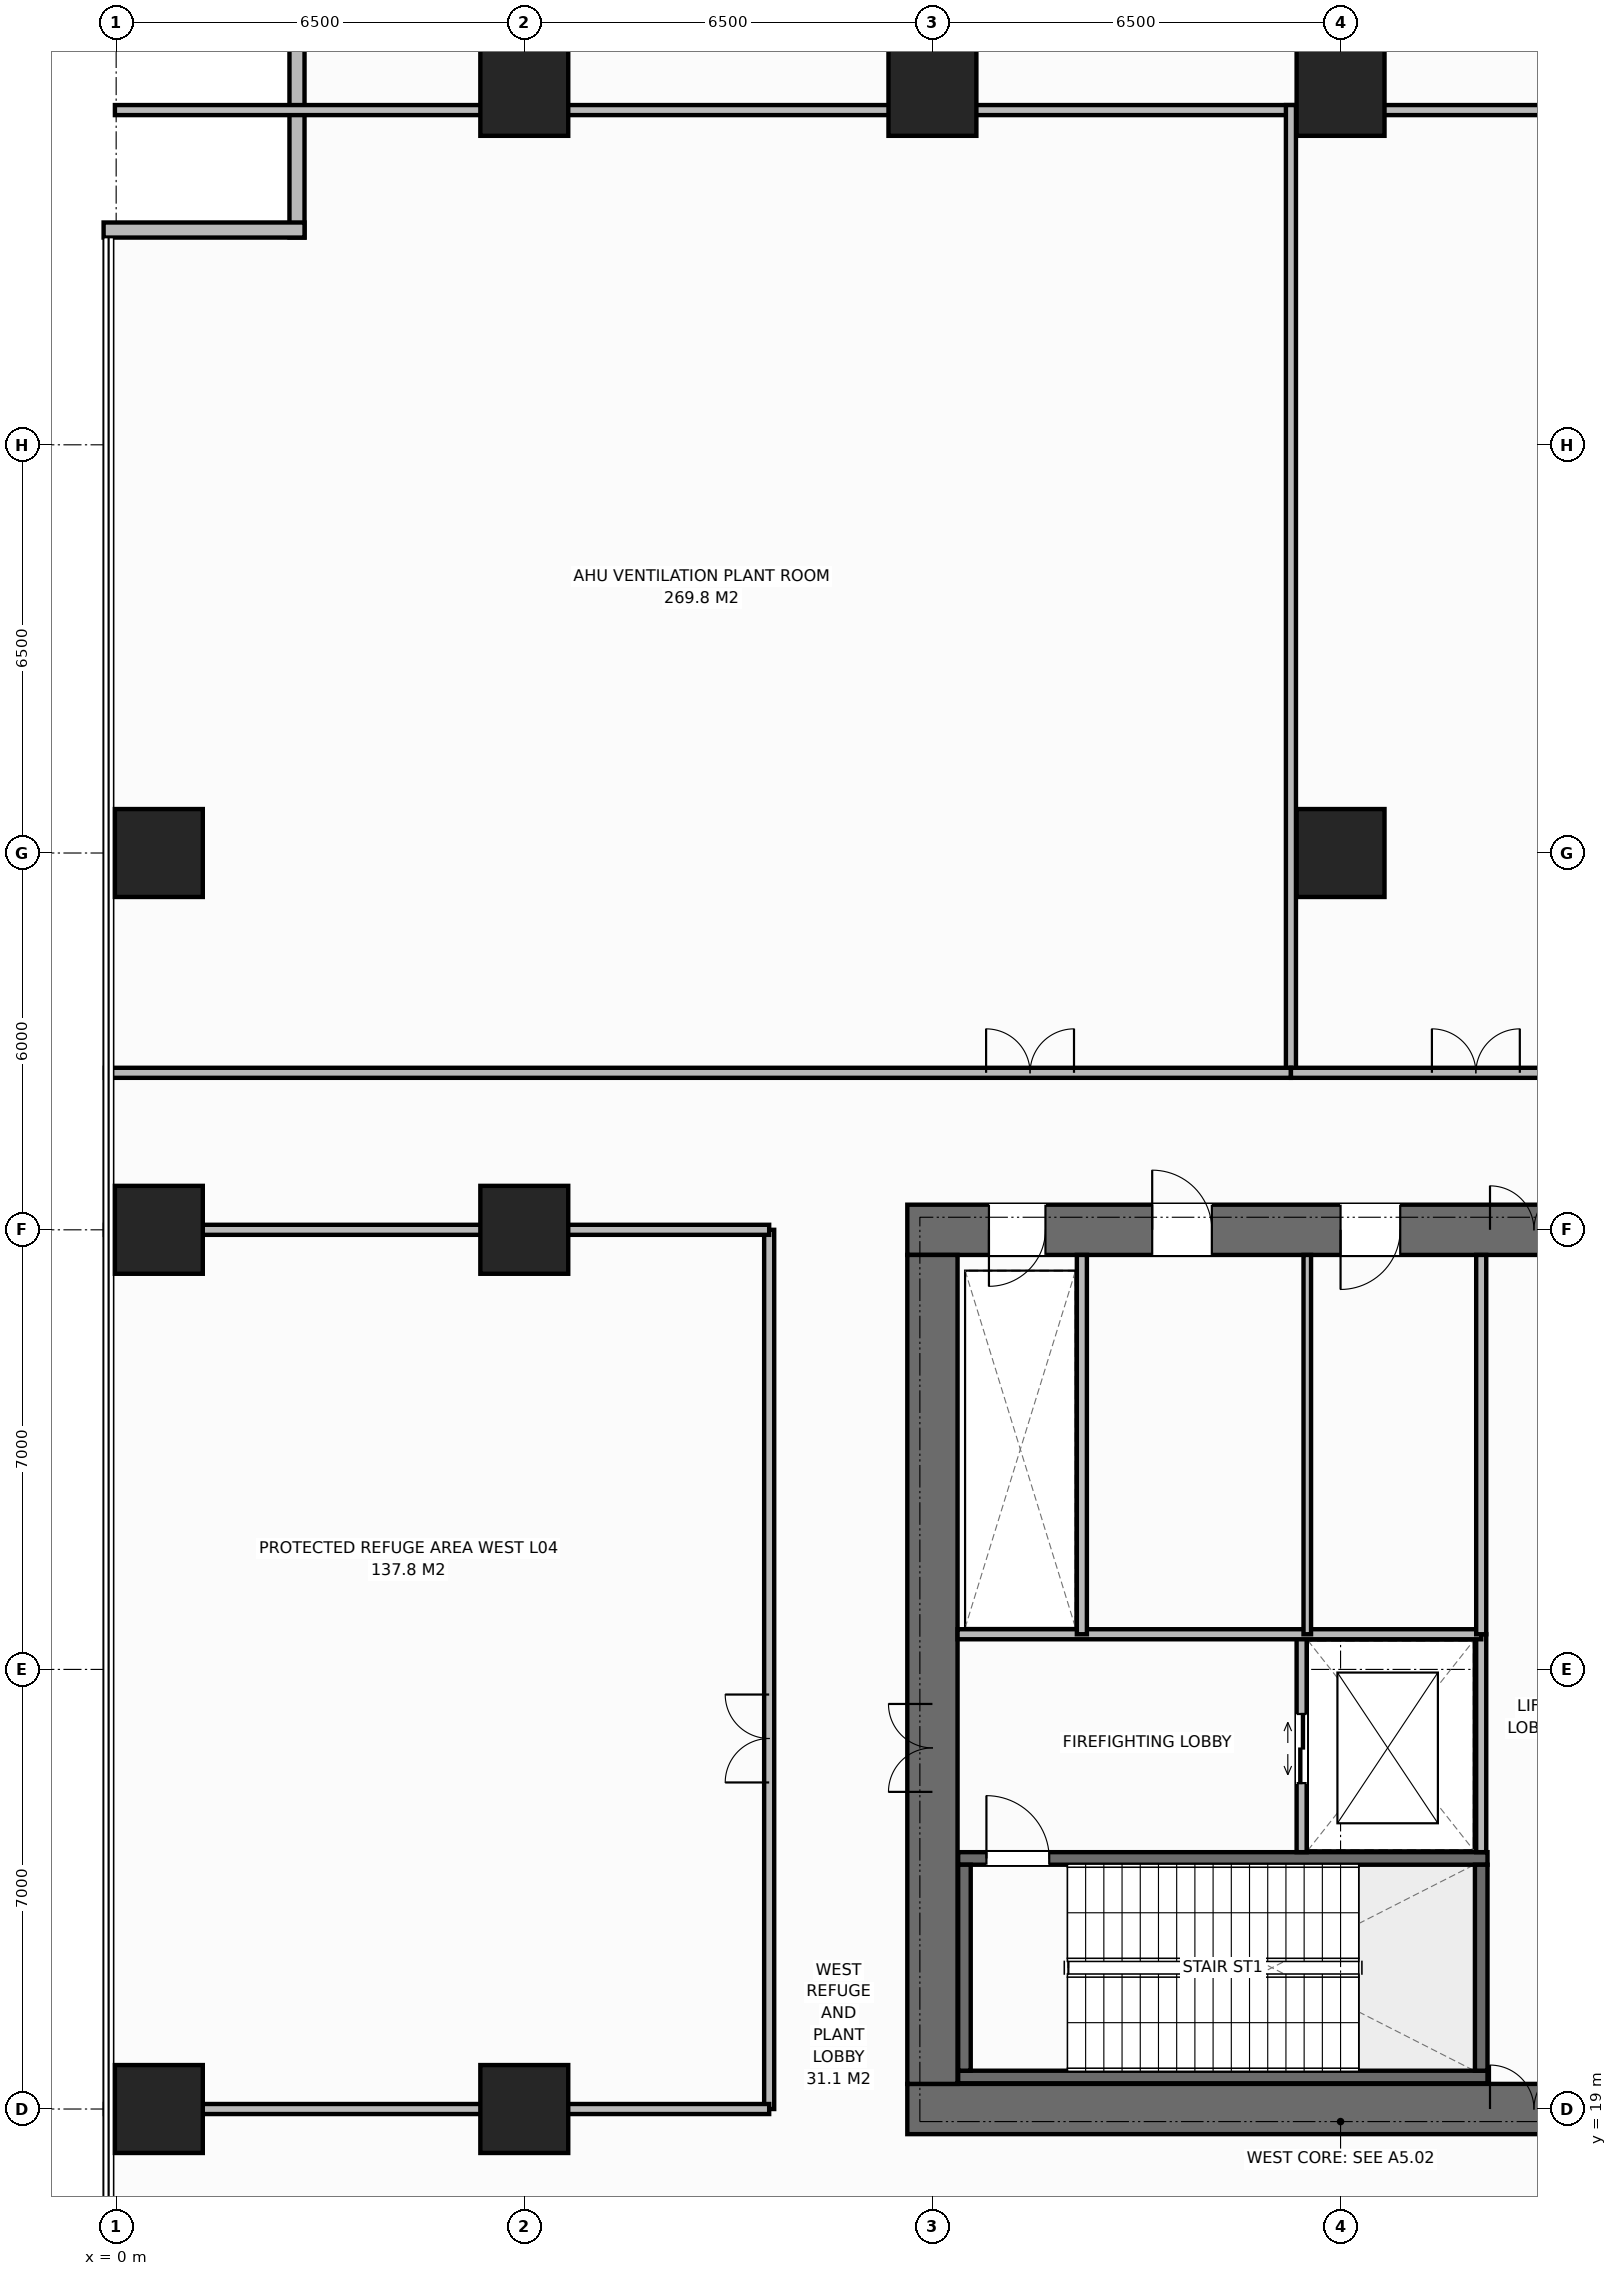
"""IFC4 building model, lengths in metres.
Left out: names, types, materials, properties, quantities, classifications, styles, units other than length and angle.
Written with IfcOpenShell. Run it as: python <this file> out.ifc"""

import sys

from ifc_helpers import new_model, si_unit, direction, frame, frame_2d, origin, origin_2d, place, context, subcontext, project, spatial, rectangle, extrude, element, fill, save


model = new_model("IFC4")
c1 = context("Model", 3, precision=1e-05, world=origin(), true_north=direction((0.0, 1.0)))
c2 = subcontext(c1, "Body", "Model", "MODEL_VIEW")
j1 = project(units=[si_unit("LENGTHUNIT", "METRE"), si_unit("PLANEANGLEUNIT", "RADIAN")], contexts=[c1])
p1 = place(None, origin())
s1 = spatial("IfcSite", under=j1, at=p1, CompositionType="ELEMENT")
p2 = place(p1, origin())
s2 = spatial("IfcBuilding", under=s1, at=p2, CompositionType="ELEMENT")
p3 = place(p2, frame((0.0, 0.0, 22.0)))
s3 = spatial("IfcBuildingStorey", under=s2, at=p3, CompositionType="ELEMENT", Elevation=22.0)
p4 = place(p3, frame((12.6, 19.0, 0.0), z_axis=(0.0, 0.0, 1.0), x_axis=(1.0, 0.0, 0.0)))
e1 = element("IfcWall", 1, at=p4, inside=s3, PredefinedType="SHEAR", context=c2, shape_type="SweptSolid", body=[
    extrude(rectangle(XDim=13.8, YDim=0.8, at=frame_2d((6.9, 0.0))), origin(), (0.0, 0.0, 1.0), 5.8),
])
p5 = place(p4, frame((9.28, 0.0, 0.0)))
e2 = element("IfcOpeningElement", 2, at=p5, cuts=e1, PredefinedType="OPENING", context=c2, shape_type="SweptSolid", body=[
    extrude(rectangle(XDim=1.4, YDim=2.2, at=frame_2d((0.7, 1.1))), frame((0.0, 0.41, 0.0), z_axis=(0.0, -1.0, 0.0), x_axis=(1.0, 0.0, 0.0)), (0.0, 0.0, 1.0), 0.82),
])
p6 = place(p3, frame((12.6, 33.0, 0.0), z_axis=(0.0, 0.0, 1.0), x_axis=(1.0, 0.0, 0.0)))
e3 = element("IfcWall", 3, at=p6, inside=s3, PredefinedType="SHEAR", context=c2, shape_type="SweptSolid", body=[
    extrude(rectangle(XDim=13.8, YDim=0.8, at=frame_2d((6.9, 0.0))), origin(), (0.0, 0.0, 1.0), 5.8),
])
p7 = place(p6, frame((1.3, 0.0, 0.0)))
e4 = element("IfcOpeningElement", 4, at=p7, cuts=e3, PredefinedType="OPENING", context=c2, shape_type="SweptSolid", body=[
    extrude(rectangle(XDim=0.9, YDim=2.15, at=frame_2d((0.45, 1.075))), frame((0.0, 0.41, 0.0), z_axis=(0.0, -1.0, 0.0), x_axis=(1.0, 0.0, 0.0)), (0.0, 0.0, 1.0), 0.82),
])
p8 = place(p6, frame((3.9, 0.0, 0.0)))
e5 = element("IfcOpeningElement", 5, at=p8, cuts=e3, PredefinedType="OPENING", context=c2, shape_type="SweptSolid", body=[
    extrude(rectangle(XDim=0.95, YDim=2.15, at=frame_2d((0.475, 1.075))), frame((0.0, 0.41, 0.0), z_axis=(0.0, -1.0, 0.0), x_axis=(1.0, 0.0, 0.0)), (0.0, 0.0, 1.0), 0.82),
])
p9 = place(p6, frame((6.9, 0.0, 0.0)))
e6 = element("IfcOpeningElement", 6, at=p9, cuts=e3, PredefinedType="OPENING", context=c2, shape_type="SweptSolid", body=[
    extrude(rectangle(XDim=0.95, YDim=2.15, at=frame_2d((0.475, 1.075))), frame((0.0, 0.41, 0.0), z_axis=(0.0, -1.0, 0.0), x_axis=(1.0, 0.0, 0.0)), (0.0, 0.0, 1.0), 0.82),
])
p10 = place(p6, frame((9.28, 0.0, 0.0)))
e7 = element("IfcOpeningElement", 7, at=p10, cuts=e3, PredefinedType="OPENING", context=c2, shape_type="SweptSolid", body=[
    extrude(rectangle(XDim=1.4, YDim=2.2, at=frame_2d((0.7, 1.1))), frame((0.0, 0.41, 0.0), z_axis=(0.0, -1.0, 0.0), x_axis=(1.0, 0.0, 0.0)), (0.0, 0.0, 1.0), 0.82),
])
p11 = place(p3, frame((13.0, 19.4, 0.0), z_axis=(0.0, 0.0, 1.0), x_axis=(0.0, 1.0, 0.0)))
e8 = element("IfcWall", 8, at=p11, inside=s3, PredefinedType="SHEAR", context=c2, shape_type="SweptSolid", body=[
    extrude(rectangle(XDim=13.2, YDim=0.8, at=frame_2d((6.6, 0.0))), origin(), (0.0, 0.0, 1.0), 5.8),
])
p12 = place(p11, frame((4.65, 0.0, 0.0)))
e9 = element("IfcOpeningElement", 9, at=p12, cuts=e8, PredefinedType="OPENING", context=c2, shape_type="SweptSolid", body=[
    extrude(rectangle(XDim=1.4, YDim=2.2, at=frame_2d((0.7, 1.1))), frame((0.0, 0.41, 0.0), z_axis=(0.0, -1.0, 0.0), x_axis=(1.0, 0.0, 0.0)), (0.0, 0.0, 1.0), 0.82),
])
p13 = place(p3, frame((13.41, 19.51, 0.0), z_axis=(0.0, 0.0, 1.0), x_axis=(1.0, 0.0, 0.0)))
e10 = element("IfcWall", 10, at=p13, inside=s3, PredefinedType="SHEAR", context=c2, shape_type="SweptSolid", body=[
    extrude(rectangle(XDim=8.43, YDim=0.2, at=frame_2d((4.215, 0.0))), origin(), (0.0, 0.0, 1.0), 5.8),
])
p14 = place(p3, frame((13.41, 22.99, 0.0), z_axis=(0.0, 0.0, 1.0), x_axis=(1.0, 0.0, 0.0)))
e11 = element("IfcWall", 11, at=p14, inside=s3, PredefinedType="SHEAR", context=c2, shape_type="SweptSolid", body=[
    extrude(rectangle(XDim=8.43, YDim=0.2, at=frame_2d((4.215, 0.0))), origin(), (0.0, 0.0, 1.0), 5.8),
])
p15 = place(p14, frame((0.45, 0.0, 0.0)))
e12 = element("IfcOpeningElement", 12, at=p15, cuts=e11, PredefinedType="OPENING", context=c2, shape_type="SweptSolid", body=[
    extrude(rectangle(XDim=1.0, YDim=2.15, at=frame_2d((0.5, 1.075))), frame((0.0, 0.11, 0.0), z_axis=(0.0, -1.0, 0.0), x_axis=(1.0, 0.0, 0.0)), (0.0, 0.0, 1.0), 0.22),
])
for number, where, z_axis, x_axis in (
    (13, (13.51, 19.61, 0.0), (0.0, 0.0, 1.0), (0.0, 1.0, 0.0)),
    (14, (21.74, 19.61, 0.0), (0.0, 0.0, 1.0), (0.0, 1.0, 0.0)),
):
    element("IfcWall", number, at=place(p3, frame(where, z_axis=z_axis, x_axis=x_axis)), inside=s3, PredefinedType="SHEAR", context=c2, shape_type="SweptSolid", body=[
        extrude(rectangle(XDim=3.28, YDim=0.2, at=frame_2d((1.64, 0.0))), origin(), (0.0, 0.0, 1.0), 5.8),
    ])
for number, where, z_axis, x_axis in (
    (15, (19.5, 39.0, 0.0), (0.0, 0.0, 1.0), (1.0, 0.0, 0.0)),
    (16, (6.5, 19.0, 0.0), (0.0, 0.0, 1.0), (1.0, 0.0, 0.0)),
    (17, (6.5, 33.0, 0.0), (0.0, 0.0, 1.0), (1.0, 0.0, 0.0)),
    (18, (6.5, 51.12, 0.0), (0.0, 0.0, 1.0), (1.0, 0.0, 0.0)),
    (19, (13.0, 51.12, 0.0), (0.0, 0.0, 1.0), (1.0, 0.0, 0.0)),
    (20, (19.5, 51.12, 0.0), (0.0, 0.0, 1.0), (1.0, 0.0, 0.0)),
    (21, (0.68, 19.0, 0.0), (0.0, 0.0, 1.0), (1.0, 0.0, 0.0)),
    (22, (0.68, 33.0, 0.0), (0.0, 0.0, 1.0), (1.0, 0.0, 0.0)),
    (23, (0.68, 39.0, 0.0), (0.0, 0.0, 1.0), (1.0, 0.0, 0.0)),
):
    element("IfcColumn", number, at=place(p3, frame(where, z_axis=z_axis, x_axis=x_axis)), inside=s3, PredefinedType="COLUMN", context=c2, shape_type="SweptSolid", body=[
        extrude(rectangle(XDim=1.4, YDim=1.4, at=origin_2d()), origin(), (0.0, 0.0, 1.0), 5.8),
    ])
for number, where, z_axis, x_axis in (
    (24, (2.88, 48.8, 0.0), (0.0, 0.0, 1.0), (0.0, 1.0, 0.0)),
    (25, (-0.2, 48.92, 0.0), (0.0, 0.0, 1.0), (1.0, 0.0, 0.0)),
):
    element("IfcWall", number, at=place(p3, frame(where, z_axis=z_axis, x_axis=x_axis)), inside=s3, PredefinedType="STANDARD", context=c2, shape_type="SweptSolid", body=[
        extrude(rectangle(XDim=3.2, YDim=0.24, at=frame_2d((1.6, 0.0))), origin(), (0.0, 0.0, 1.0), 5.55),
    ])
p16 = place(p3, frame((21.74, 23.09, 0.0), z_axis=(0.0, 0.0, 1.0), x_axis=(0.0, 1.0, 0.0)))
e26 = element("IfcWall", 26, at=p16, inside=s3, PredefinedType="STANDARD", context=c2, shape_type="SweptSolid", body=[
    extrude(rectangle(XDim=3.47, YDim=0.16, at=frame_2d((1.735, 0.0))), origin(), (0.0, 0.0, 1.0), 5.55),
])
p17 = place(p3, frame((18.88, 23.09, 0.0), z_axis=(0.0, 0.0, 1.0), x_axis=(0.0, 1.0, 0.0)))
e27 = element("IfcWall", 27, at=p17, inside=s3, PredefinedType="STANDARD", context=c2, shape_type="SweptSolid", body=[
    extrude(rectangle(XDim=3.47, YDim=0.16, at=frame_2d((1.735, 0.0))), origin(), (0.0, 0.0, 1.0), 5.55),
])
p18 = place(p17, frame((1.1, 0.0, 0.0)))
e28 = element("IfcOpeningElement", 28, at=p18, cuts=e27, PredefinedType="OPENING", context=c2, shape_type="SweptSolid", body=[
    extrude(rectangle(XDim=1.1, YDim=2.2, at=frame_2d((0.55, 1.1))), frame((0.0, 0.09, 0.0), z_axis=(0.0, -1.0, 0.0), x_axis=(1.0, 0.0, 0.0)), (0.0, 0.0, 1.0), 0.18),
])
p19 = place(p3, frame((13.4, 26.56, 0.0), z_axis=(0.0, 0.0, 1.0), x_axis=(1.0, 0.0, 0.0)))
e29 = element("IfcWall", 29, at=p19, inside=s3, PredefinedType="STANDARD", context=c2, shape_type="SweptSolid", body=[
    extrude(rectangle(XDim=8.34, YDim=0.16, at=frame_2d((4.17, 0.0))), origin(), (0.0, 0.0, 1.0), 5.55),
])
p20 = place(p3, frame((15.38, 26.56, 0.0), z_axis=(0.0, 0.0, 1.0), x_axis=(0.0, 1.0, 0.0)))
e30 = element("IfcWall", 30, at=p20, inside=s3, PredefinedType="STANDARD", context=c2, shape_type="SweptSolid", body=[
    extrude(rectangle(XDim=6.04, YDim=0.16, at=frame_2d((3.02, 0.0))), origin(), (0.0, 0.0, 1.0), 5.55),
])
p21 = place(p3, frame((18.97, 26.56, 0.0), z_axis=(0.0, 0.0, 1.0), x_axis=(0.0, 1.0, 0.0)))
e31 = element("IfcWall", 31, at=p21, inside=s3, PredefinedType="PARTITIONING", context=c2, shape_type="SweptSolid", body=[
    extrude(rectangle(XDim=6.04, YDim=0.12, at=frame_2d((3.02, 0.0))), origin(), (0.0, 0.0, 1.0), 5.55),
])
p22 = place(p3, frame((21.74, 26.56, 0.0), z_axis=(0.0, 0.0, 1.0), x_axis=(0.0, 1.0, 0.0)))
e32 = element("IfcWall", 32, at=p22, inside=s3, PredefinedType="STANDARD", context=c2, shape_type="SweptSolid", body=[
    extrude(rectangle(XDim=6.04, YDim=0.16, at=frame_2d((3.02, 0.0))), origin(), (0.0, 0.0, 1.0), 5.55),
])
p23 = place(p3, frame((-0.02, 50.83, 0.0), z_axis=(0.0, 0.0, 1.0), x_axis=(1.0, 0.0, 0.0)))
e33 = element("IfcWall", 33, at=p23, inside=s3, PredefinedType="STANDARD", context=c2, shape_type="SweptSolid", body=[
    extrude(rectangle(XDim=78.04, YDim=0.16, at=frame_2d((39.02, 0.0))), origin(), (0.0, 0.0, 1.0), 3.15),
])
p24 = place(p3, frame((10.4, 19.0, 0.0), z_axis=(0.0, 0.0, 1.0), x_axis=(0.0, 1.0, 0.0)))
e34 = element("IfcWall", 34, at=p24, inside=s3, PredefinedType="STANDARD", context=c2, shape_type="SweptSolid", body=[
    extrude(rectangle(XDim=14.0, YDim=0.16, at=frame_2d((7.0, 0.0))), origin(), (0.0, 0.0, 1.0), 5.55),
])
p25 = place(p24, frame((5.2, 0.0, 0.0)))
e35 = element("IfcOpeningElement", 35, at=p25, cuts=e34, PredefinedType="OPENING", context=c2, shape_type="SweptSolid", body=[
    extrude(rectangle(XDim=1.4, YDim=2.2, at=frame_2d((0.7, 1.1))), frame((0.0, 0.09, 0.0), z_axis=(0.0, -1.0, 0.0), x_axis=(1.0, 0.0, 0.0)), (0.0, 0.0, 1.0), 0.18),
])
for number, where, z_axis, x_axis in (
    (36, (-0.18, 19.0, 0.0), (0.0, 0.0, 1.0), (1.0, 0.0, 0.0)),
    (37, (-0.18, 33.0, 0.0), (0.0, 0.0, 1.0), (1.0, 0.0, 0.0)),
):
    element("IfcWall", number, at=place(p3, frame(where, z_axis=z_axis, x_axis=x_axis)), inside=s3, PredefinedType="STANDARD", context=c2, shape_type="SweptSolid", body=[
        extrude(rectangle(XDim=10.58, YDim=0.16, at=frame_2d((5.29, 0.0))), origin(), (0.0, 0.0, 1.0), 4.9),
    ])
p26 = place(p3, frame((18.71, 35.5, 0.0), z_axis=(0.0, 0.0, 1.0), x_axis=(0.0, 1.0, 0.0)))
e38 = element("IfcWall", 38, at=p26, inside=s3, PredefinedType="STANDARD", context=c2, shape_type="SweptSolid", body=[
    extrude(rectangle(XDim=15.41, YDim=0.16, at=frame_2d((7.705, 0.0))), origin(), (0.0, 0.0, 1.0), 5.55),
])
p27 = place(p3, frame((-0.18, 35.5, 0.0), z_axis=(0.0, 0.0, 1.0), x_axis=(1.0, 0.0, 0.0)))
e39 = element("IfcWall", 39, at=p27, inside=s3, PredefinedType="STANDARD", context=c2, shape_type="SweptSolid", body=[
    extrude(rectangle(XDim=18.89, YDim=0.16, at=frame_2d((9.445, 0.0))), origin(), (0.0, 0.0, 1.0), 5.55),
])
p28 = place(p27, frame((14.035, 0.0, 0.0)))
e40 = element("IfcOpeningElement", 40, at=p28, cuts=e39, PredefinedType="OPENING", context=c2, shape_type="SweptSolid", body=[
    extrude(rectangle(XDim=1.4, YDim=2.2, at=frame_2d((0.7, 1.1))), frame((0.0, 0.09, 0.0), z_axis=(0.0, -1.0, 0.0), x_axis=(1.0, 0.0, 0.0)), (0.0, 0.0, 1.0), 0.18),
])
p29 = place(p3, frame((18.71, 35.5, 0.0), z_axis=(0.0, 0.0, 1.0), x_axis=(1.0, 0.0, 0.0)))
e41 = element("IfcWall", 41, at=p29, inside=s3, PredefinedType="STANDARD", context=c2, shape_type="SweptSolid", body=[
    extrude(rectangle(XDim=20.29, YDim=0.16, at=frame_2d((10.145, 0.0))), origin(), (0.0, 0.0, 1.0), 5.55),
])
p30 = place(p29, frame((2.245, 0.0, 0.0)))
e42 = element("IfcOpeningElement", 42, at=p30, cuts=e41, PredefinedType="OPENING", context=c2, shape_type="SweptSolid", body=[
    extrude(rectangle(XDim=1.4, YDim=2.2, at=frame_2d((0.7, 1.1))), frame((0.0, 0.09, 0.0), z_axis=(0.0, -1.0, 0.0), x_axis=(1.0, 0.0, 0.0)), (0.0, 0.0, 1.0), 0.18),
])
p31 = place(p15, origin())
e43 = element("IfcDoor", 43, at=p31, inside=s3, OperationType="SINGLE_SWING_LEFT", PredefinedType="DOOR", context=c2, shape_type="SweptSolid", body=[
    extrude(rectangle(XDim=1.0, YDim=2.15, at=frame_2d((0.5, 1.075))), frame((0.0, 0.025, 0.0), z_axis=(0.0, -1.0, 0.0), x_axis=(1.0, 0.0, 0.0)), (0.0, 0.0, 1.0), 0.05),
])
fill(e12, e43)
p32 = place(p12, origin())
e44 = element("IfcDoor", 44, at=p32, inside=s3, OperationType="DOUBLE_DOOR_SINGLE_SWING", PredefinedType="DOOR", context=c2, shape_type="SweptSolid", body=[
    extrude(rectangle(XDim=1.4, YDim=2.2, at=frame_2d((0.7, 1.1))), frame((0.0, 0.025, 0.0), z_axis=(0.0, -1.0, 0.0), x_axis=(1.0, 0.0, 0.0)), (0.0, 0.0, 1.0), 0.05),
])
fill(e9, e44)
p33 = place(p18, origin())
e45 = element("IfcDoor", 45, at=p33, inside=s3, OperationType="DOUBLE_DOOR_SLIDING", PredefinedType="DOOR", context=c2, shape_type="SweptSolid", body=[
    extrude(rectangle(XDim=1.1, YDim=2.2, at=frame_2d((0.55, 1.1))), frame((0.0, 0.025, 0.0), z_axis=(0.0, -1.0, 0.0), x_axis=(1.0, 0.0, 0.0)), (0.0, 0.0, 1.0), 0.05),
])
fill(e28, e45)
p34 = place(p7, origin())
e46 = element("IfcDoor", 46, at=p34, inside=s3, OperationType="SINGLE_SWING_RIGHT", PredefinedType="DOOR", context=c2, shape_type="SweptSolid", body=[
    extrude(rectangle(XDim=0.9, YDim=2.15, at=frame_2d((0.45, 1.075))), frame((0.0, -0.075, 0.0), z_axis=(0.0, -1.0, 0.0), x_axis=(1.0, 0.0, 0.0)), (0.0, 0.0, 1.0), 0.05),
])
fill(e4, e46)
p35 = place(p8, origin())
e47 = element("IfcDoor", 47, at=p35, inside=s3, OperationType="SINGLE_SWING_LEFT", PredefinedType="DOOR", context=c2, shape_type="SweptSolid", body=[
    extrude(rectangle(XDim=0.95, YDim=2.15, at=frame_2d((0.475, 1.075))), frame((0.0, -0.075, 0.0), z_axis=(0.0, -1.0, 0.0), x_axis=(1.0, 0.0, 0.0)), (0.0, 0.0, 1.0), 0.05),
])
fill(e5, e47)
p36 = place(p9, origin())
e48 = element("IfcDoor", 48, at=p36, inside=s3, OperationType="SINGLE_SWING_RIGHT", PredefinedType="DOOR", context=c2, shape_type="SweptSolid", body=[
    extrude(rectangle(XDim=0.95, YDim=2.15, at=frame_2d((0.475, 1.075))), frame((0.0, -0.075, 0.0), z_axis=(0.0, -1.0, 0.0), x_axis=(1.0, 0.0, 0.0)), (0.0, 0.0, 1.0), 0.05),
])
fill(e6, e48)
p37 = place(p5, origin())
e49 = element("IfcDoor", 49, at=p37, inside=s3, OperationType="DOUBLE_DOOR_SINGLE_SWING", PredefinedType="DOOR", context=c2, shape_type="SweptSolid", body=[
    extrude(rectangle(XDim=1.4, YDim=2.2, at=frame_2d((0.7, 1.1))), frame((0.0, 0.125, 0.0), z_axis=(0.0, -1.0, 0.0), x_axis=(1.0, 0.0, 0.0)), (0.0, 0.0, 1.0), 0.05),
])
fill(e2, e49)
p38 = place(p10, origin())
e50 = element("IfcDoor", 50, at=p38, inside=s3, OperationType="DOUBLE_DOOR_SINGLE_SWING", PredefinedType="DOOR", context=c2, shape_type="SweptSolid", body=[
    extrude(rectangle(XDim=1.4, YDim=2.2, at=frame_2d((0.7, 1.1))), frame((0.0, -0.075, 0.0), z_axis=(0.0, -1.0, 0.0), x_axis=(1.0, 0.0, 0.0)), (0.0, 0.0, 1.0), 0.05),
])
fill(e7, e50)
p39 = place(p25, origin())
e51 = element("IfcDoor", 51, at=p39, inside=s3, OperationType="DOUBLE_DOOR_SINGLE_SWING", PredefinedType="DOOR", context=c2, shape_type="SweptSolid", body=[
    extrude(rectangle(XDim=1.4, YDim=2.2, at=frame_2d((0.7, 1.1))), frame((0.0, 0.025, 0.0), z_axis=(0.0, -1.0, 0.0), x_axis=(1.0, 0.0, 0.0)), (0.0, 0.0, 1.0), 0.05),
])
fill(e35, e51)
p40 = place(p28, origin())
e52 = element("IfcDoor", 52, at=p40, inside=s3, OperationType="DOUBLE_DOOR_SINGLE_SWING", PredefinedType="DOOR", context=c2, shape_type="SweptSolid", body=[
    extrude(rectangle(XDim=1.4, YDim=2.2, at=frame_2d((0.7, 1.1))), frame((0.0, 0.025, 0.0), z_axis=(0.0, -1.0, 0.0), x_axis=(1.0, 0.0, 0.0)), (0.0, 0.0, 1.0), 0.05),
])
fill(e40, e52)
p41 = place(p30, origin())
e53 = element("IfcDoor", 53, at=p41, inside=s3, OperationType="DOUBLE_DOOR_SINGLE_SWING", PredefinedType="DOOR", context=c2, shape_type="SweptSolid", body=[
    extrude(rectangle(XDim=1.4, YDim=2.2, at=frame_2d((0.7, 1.1))), frame((0.0, 0.025, 0.0), z_axis=(0.0, -1.0, 0.0), x_axis=(1.0, 0.0, 0.0)), (0.0, 0.0, 1.0), 0.05),
])
fill(e42, e53)
save(model, sys.argv[1])
